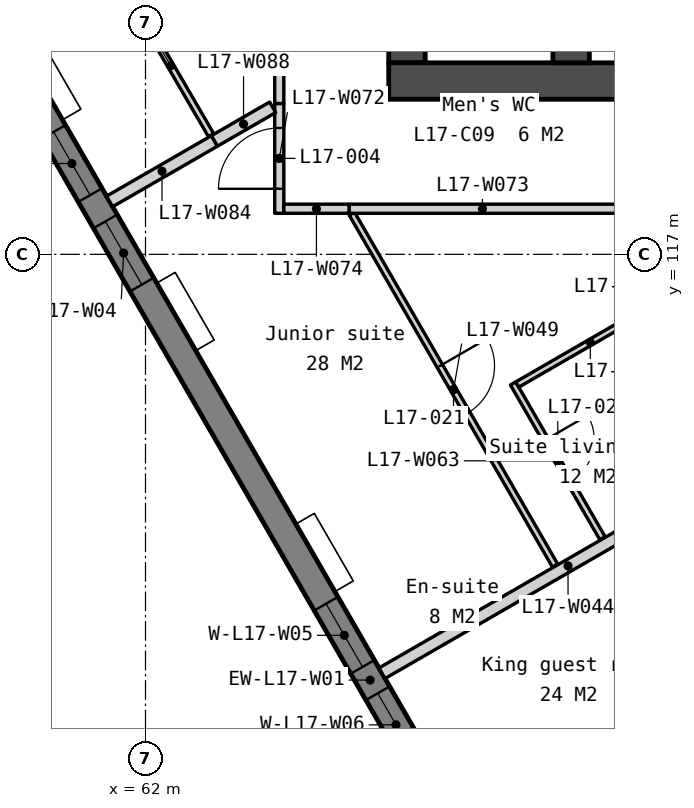
"""IFC4 building model, lengths in metres.
Left out: names, types, materials, properties, quantities, classifications, styles, units other than length and angle.
Written with IfcOpenShell. Run it as: python <this file> out.ifc"""

import sys

from ifc_helpers import new_model, si_unit, direction, frame, frame_2d, origin, place, context, subcontext, project, spatial, polyline, rectangle, outline, extrude, element, fill, save


model = new_model("IFC4")
c1 = context("Model", 3, precision=1e-05, world=origin(), true_north=direction((0.0, 1.0)))
c2 = subcontext(c1, "Body", "Model", "MODEL_VIEW")
j1 = project(units=[si_unit("LENGTHUNIT", "METRE"), si_unit("PLANEANGLEUNIT", "RADIAN")], contexts=[c1])
p1 = place(None, origin())
s1 = spatial("IfcSite", under=j1, at=p1, CompositionType="ELEMENT")
p2 = place(p1, origin())
s2 = spatial("IfcBuilding", under=s1, at=p2, CompositionType="ELEMENT")
p3 = place(p2, frame((0.0, 0.0, 73.5)))
s3 = spatial("IfcBuildingStorey", under=s2, at=p3, CompositionType="ELEMENT", Elevation=73.5)
p4 = place(p3, frame((66.3, 133.95, 0.0), z_axis=(0.0, 0.0, 1.0), x_axis=(0.0, -1.0, 0.0)))
e1 = element("IfcWall", 1, at=p4, inside=s3, PredefinedType="SOLIDWALL", context=c2, shape_type="SweptSolid", body=[
    extrude(rectangle(XDim=13.8, YDim=0.6, at=frame_2d((6.9, 0.0))), origin(), (0.0, 0.0, 1.0), 3.25),
])
p5 = place(p4, frame((0.6, 0.0, 0.0)))
e2 = element("IfcOpeningElement", 2, at=p5, cuts=e1, PredefinedType="OPENING", context=c2, shape_type="SweptSolid", body=[
    extrude(rectangle(XDim=1.1, YDim=2.1, at=frame_2d((0.55, 1.05))), frame((0.0, 0.31, 0.0), z_axis=(0.0, -1.0, 0.0), x_axis=(1.0, 0.0, 0.0)), (0.0, 0.0, 1.0), 0.62),
])
p6 = place(p4, frame((8.963, 0.0, 0.0)))
e3 = element("IfcOpeningElement", 3, at=p6, cuts=e1, PredefinedType="OPENING", context=c2, shape_type="SweptSolid", body=[
    extrude(rectangle(XDim=1.0, YDim=2.1, at=frame_2d((0.5, 1.05))), frame((0.0, 0.31, 0.0), z_axis=(0.0, -1.0, 0.0), x_axis=(1.0, 0.0, 0.0)), (0.0, 0.0, 1.0), 0.62),
])
p7 = place(p4, frame((11.888, 0.0, 0.0)))
e4 = element("IfcOpeningElement", 4, at=p7, cuts=e1, PredefinedType="OPENING", context=c2, shape_type="SweptSolid", body=[
    extrude(rectangle(XDim=1.0, YDim=2.1, at=frame_2d((0.5, 1.05))), frame((0.0, 0.31, 0.0), z_axis=(0.0, -1.0, 0.0), x_axis=(1.0, 0.0, 0.0)), (0.0, 0.0, 1.0), 0.62),
])
p8 = place(p3, frame((66.0, 119.85, 0.0), z_axis=(0.0, 0.0, 1.0), x_axis=(1.0, 0.0, 0.0)))
e5 = element("IfcWall", 5, at=p8, inside=s3, PredefinedType="SOLIDWALL", context=c2, shape_type="SweptSolid", body=[
    extrude(rectangle(XDim=28.0, YDim=0.6, at=frame_2d((14.0, 0.0))), origin(), (0.0, 0.0, 1.0), 3.25),
])
p9 = place(p8, frame((6.825, 0.0, 0.0)))
e6 = element("IfcOpeningElement", 6, at=p9, cuts=e5, PredefinedType="OPENING", context=c2, shape_type="SweptSolid", body=[
    extrude(rectangle(XDim=1.8, YDim=2.1, at=frame_2d((0.9, 1.05))), frame((0.0, 0.31, 0.0), z_axis=(0.0, -1.0, 0.0), x_axis=(1.0, 0.0, 0.0)), (0.0, 0.0, 1.0), 0.62),
])
p10 = place(p8, frame((15.85, 0.0, 0.0)))
e7 = element("IfcOpeningElement", 7, at=p10, cuts=e5, PredefinedType="OPENING", context=c2, shape_type="SweptSolid", body=[
    extrude(rectangle(XDim=1.5, YDim=2.1, at=frame_2d((0.75, 1.05))), frame((0.0, 0.31, 0.0), z_axis=(0.0, -1.0, 0.0), x_axis=(1.0, 0.0, 0.0)), (0.0, 0.0, 1.0), 0.62),
])
p11 = place(p8, frame((19.375, 0.0, 0.0)))
e8 = element("IfcOpeningElement", 8, at=p11, cuts=e5, PredefinedType="OPENING", context=c2, shape_type="SweptSolid", body=[
    extrude(rectangle(XDim=1.8, YDim=2.1, at=frame_2d((0.9, 1.05))), frame((0.0, 0.31, 0.0), z_axis=(0.0, -1.0, 0.0), x_axis=(1.0, 0.0, 0.0)), (0.0, 0.0, 1.0), 0.62),
])
p12 = place(p8, frame((4.425, 0.0, 0.0)))
e9 = element("IfcOpeningElement", 9, at=p12, cuts=e5, PredefinedType="OPENING", context=c2, shape_type="SweptSolid", body=[
    extrude(rectangle(XDim=1.0, YDim=2.1, at=frame_2d((0.5, 1.05))), frame((0.0, 0.31, 0.0), z_axis=(0.0, -1.0, 0.0), x_axis=(1.0, 0.0, 0.0)), (0.0, 0.0, 1.0), 0.62),
])
p13 = place(p8, frame((9.783, 0.0, 0.0)))
e10 = element("IfcOpeningElement", 10, at=p13, cuts=e5, PredefinedType="OPENING", context=c2, shape_type="SweptSolid", body=[
    extrude(rectangle(XDim=1.0, YDim=2.1, at=frame_2d((0.5, 1.05))), frame((0.0, 0.31, 0.0), z_axis=(0.0, -1.0, 0.0), x_axis=(1.0, 0.0, 0.0)), (0.0, 0.0, 1.0), 0.62),
])
p14 = place(p8, frame((11.525, 0.0, 0.0)))
e11 = element("IfcOpeningElement", 11, at=p14, cuts=e5, PredefinedType="OPENING", context=c2, shape_type="SweptSolid", body=[
    extrude(rectangle(XDim=1.0, YDim=2.1, at=frame_2d((0.5, 1.05))), frame((0.0, 0.31, 0.0), z_axis=(0.0, -1.0, 0.0), x_axis=(1.0, 0.0, 0.0)), (0.0, 0.0, 1.0), 0.62),
])
p15 = place(p8, frame((13.658, 0.0, 0.0)))
e12 = element("IfcOpeningElement", 12, at=p15, cuts=e5, PredefinedType="OPENING", context=c2, shape_type="SweptSolid", body=[
    extrude(rectangle(XDim=1.0, YDim=2.1, at=frame_2d((0.5, 1.05))), frame((0.0, 0.31, 0.0), z_axis=(0.0, -1.0, 0.0), x_axis=(1.0, 0.0, 0.0)), (0.0, 0.0, 1.0), 0.62),
])
p16 = place(p8, frame((22.575, 0.0, 0.0)))
e13 = element("IfcOpeningElement", 13, at=p16, cuts=e5, PredefinedType="OPENING", context=c2, shape_type="SweptSolid", body=[
    extrude(rectangle(XDim=1.0, YDim=2.1, at=frame_2d((0.5, 1.05))), frame((0.0, 0.31, 0.0), z_axis=(0.0, -1.0, 0.0), x_axis=(1.0, 0.0, 0.0)), (0.0, 0.0, 1.0), 0.62),
])
p17 = place(p3, frame((69.0, 122.25, 0.0), z_axis=(0.0, 0.0, 1.0), x_axis=(0.0, -1.0, 0.0)))
e14 = element("IfcWall", 14, at=p17, inside=s3, PredefinedType="SOLIDWALL", context=c2, shape_type="SweptSolid", body=[
    extrude(rectangle(XDim=2.1, YDim=0.6, at=frame_2d((1.05, 0.0))), origin(), (0.0, 0.0, 1.0), 3.25),
])
p18 = place(p3, frame((54.495, 129.397, -0.15), z_axis=(0.0, 0.0, 1.0), x_axis=(0.499999201451, -0.866025864826, 0.0)))
e15 = element("IfcWall", 15, at=p18, inside=s3, PredefinedType="SOLIDWALL", context=c2, shape_type="SweptSolid", body=[
    extrude(outline(polyline([(44.8, 0.0), (44.8, 3.4), (0.0, 3.4), (0.0, 0.0), (44.8, 0.0)])), frame((0.0, 0.225, 0.0), z_axis=(0.0, -1.0, 0.0), x_axis=(1.0, 0.0, 0.0)), (0.0, 0.0, 1.0), 0.45),
])
p19 = place(p18, frame((3.03, 0.0, 1.05)))
e16 = element("IfcOpeningElement", 16, at=p19, cuts=e15, PredefinedType="OPENING", context=c2, shape_type="SweptSolid", body=[
    extrude(rectangle(XDim=1.2, YDim=1.5, at=frame_2d((0.6, 0.75))), frame((0.0, 0.235, 0.0), z_axis=(0.0, -1.0, 0.0), x_axis=(1.0, 0.0, 0.0)), (0.0, 0.0, 1.0), 0.47),
])
p20 = place(p18, frame((4.73, 0.0, 1.05)))
e17 = element("IfcOpeningElement", 17, at=p20, cuts=e15, PredefinedType="OPENING", context=c2, shape_type="SweptSolid", body=[
    extrude(rectangle(XDim=1.2, YDim=1.5, at=frame_2d((0.6, 0.75))), frame((0.0, 0.235, 0.0), z_axis=(0.0, -1.0, 0.0), x_axis=(1.0, 0.0, 0.0)), (0.0, 0.0, 1.0), 0.47),
])
p21 = place(p18, frame((11.99, 0.0, 1.05)))
e18 = element("IfcOpeningElement", 18, at=p21, cuts=e15, PredefinedType="OPENING", context=c2, shape_type="SweptSolid", body=[
    extrude(rectangle(XDim=1.2, YDim=1.5, at=frame_2d((0.6, 0.75))), frame((0.0, 0.235, 0.0), z_axis=(0.0, -1.0, 0.0), x_axis=(1.0, 0.0, 0.0)), (0.0, 0.0, 1.0), 0.47),
])
p22 = place(p18, frame((13.69, 0.0, 1.05)))
e19 = element("IfcOpeningElement", 19, at=p22, cuts=e15, PredefinedType="OPENING", context=c2, shape_type="SweptSolid", body=[
    extrude(rectangle(XDim=1.2, YDim=1.5, at=frame_2d((0.6, 0.75))), frame((0.0, 0.235, 0.0), z_axis=(0.0, -1.0, 0.0), x_axis=(1.0, 0.0, 0.0)), (0.0, 0.0, 1.0), 0.47),
])
p23 = place(p18, frame((20.95, 0.0, 1.05)))
e20 = element("IfcOpeningElement", 20, at=p23, cuts=e15, PredefinedType="OPENING", context=c2, shape_type="SweptSolid", body=[
    extrude(rectangle(XDim=1.2, YDim=1.5, at=frame_2d((0.6, 0.75))), frame((0.0, 0.235, 0.0), z_axis=(0.0, -1.0, 0.0), x_axis=(1.0, 0.0, 0.0)), (0.0, 0.0, 1.0), 0.47),
])
p24 = place(p18, frame((22.65, 0.0, 1.05)))
e21 = element("IfcOpeningElement", 21, at=p24, cuts=e15, PredefinedType="OPENING", context=c2, shape_type="SweptSolid", body=[
    extrude(rectangle(XDim=1.2, YDim=1.5, at=frame_2d((0.6, 0.75))), frame((0.0, 0.235, 0.0), z_axis=(0.0, -1.0, 0.0), x_axis=(1.0, 0.0, 0.0)), (0.0, 0.0, 1.0), 0.47),
])
p25 = place(p18, frame((29.91, 0.0, 1.05)))
e22 = element("IfcOpeningElement", 22, at=p25, cuts=e15, PredefinedType="OPENING", context=c2, shape_type="SweptSolid", body=[
    extrude(rectangle(XDim=1.2, YDim=1.5, at=frame_2d((0.6, 0.75))), frame((0.0, 0.235, 0.0), z_axis=(0.0, -1.0, 0.0), x_axis=(1.0, 0.0, 0.0)), (0.0, 0.0, 1.0), 0.47),
])
p26 = place(p18, frame((31.61, 0.0, 1.05)))
e23 = element("IfcOpeningElement", 23, at=p26, cuts=e15, PredefinedType="OPENING", context=c2, shape_type="SweptSolid", body=[
    extrude(rectangle(XDim=1.2, YDim=1.5, at=frame_2d((0.6, 0.75))), frame((0.0, 0.235, 0.0), z_axis=(0.0, -1.0, 0.0), x_axis=(1.0, 0.0, 0.0)), (0.0, 0.0, 1.0), 0.47),
])
p27 = place(p18, frame((38.87, 0.0, 1.05)))
e24 = element("IfcOpeningElement", 24, at=p27, cuts=e15, PredefinedType="OPENING", context=c2, shape_type="SweptSolid", body=[
    extrude(rectangle(XDim=1.2, YDim=1.5, at=frame_2d((0.6, 0.75))), frame((0.0, 0.235, 0.0), z_axis=(0.0, -1.0, 0.0), x_axis=(1.0, 0.0, 0.0)), (0.0, 0.0, 1.0), 0.47),
])
p28 = place(p18, frame((40.57, 0.0, 1.05)))
e25 = element("IfcOpeningElement", 25, at=p28, cuts=e15, PredefinedType="OPENING", context=c2, shape_type="SweptSolid", body=[
    extrude(rectangle(XDim=1.2, YDim=1.5, at=frame_2d((0.6, 0.75))), frame((0.0, 0.235, 0.0), z_axis=(0.0, -1.0, 0.0), x_axis=(1.0, 0.0, 0.0)), (0.0, 0.0, 1.0), 0.47),
])
p29 = place(p3, frame((65.89, 110.11, 0.0), z_axis=(0.0, 0.0, 1.0), x_axis=(0.866033669941, 0.499985682323, 0.0)))
e26 = element("IfcWall", 26, at=p29, inside=s3, PredefinedType="PARTITIONING", context=c2, shape_type="SweptSolid", body=[
    extrude(rectangle(XDim=7.065, YDim=0.2, at=frame_2d((3.533, 0.0))), origin(), (0.0, 0.0, 1.0), 3.25),
])
p30 = place(p3, frame((65.395, 117.668, 0.0), z_axis=(0.0, 0.0, 1.0), x_axis=(0.499986003774, -0.866033484359, 0.0)))
e27 = element("IfcWall", 27, at=p30, inside=s3, PredefinedType="PARTITIONING", context=c2, shape_type="SweptSolid", body=[
    extrude(rectangle(XDim=6.682, YDim=0.1, at=frame_2d((3.341, 0.0))), origin(), (0.0, 0.0, 1.0), 3.25),
])
p31 = place(p30, frame((2.891, 0.0, 0.0)))
e28 = element("IfcOpeningElement", 28, at=p31, cuts=e27, PredefinedType="OPENING", context=c2, shape_type="SweptSolid", body=[
    extrude(rectangle(XDim=0.9, YDim=2.1, at=frame_2d((0.45, 1.05))), frame((0.0, 0.06, 0.0), z_axis=(0.0, -1.0, 0.0), x_axis=(1.0, 0.0, 0.0)), (0.0, 0.0, 1.0), 0.12),
])
p32 = place(p3, frame((68.045, 114.877, 0.0), z_axis=(0.0, 0.0, 1.0), x_axis=(0.499988418424, -0.866032090307, 0.0)))
e29 = element("IfcWall", 29, at=p32, inside=s3, PredefinedType="PARTITIONING", context=c2, shape_type="SweptSolid", body=[
    extrude(rectangle(XDim=2.94, YDim=0.1, at=frame_2d((1.47, 0.0))), origin(), (0.0, 0.0, 1.0), 3.25),
])
p33 = place(p32, frame((1.07, 0.0, 0.0)))
e30 = element("IfcOpeningElement", 30, at=p33, cuts=e29, PredefinedType="OPENING", context=c2, shape_type="SweptSolid", body=[
    extrude(rectangle(XDim=0.8, YDim=2.1, at=frame_2d((0.4, 1.05))), frame((0.0, 0.06, 0.0), z_axis=(0.0, -1.0, 0.0), x_axis=(1.0, 0.0, 0.0)), (0.0, 0.0, 1.0), 0.12),
])
p34 = place(p3, frame((68.114, 114.858, 0.0), z_axis=(0.0, 0.0, 1.0), x_axis=(0.866042014628, 0.499971228071, 0.0)))
e31 = element("IfcWall", 31, at=p34, inside=s3, PredefinedType="PARTITIONING", context=c2, shape_type="SweptSolid", body=[
    extrude(rectangle(XDim=2.775, YDim=0.1, at=frame_2d((1.388, 0.0))), origin(), (0.0, 0.0, 1.0), 3.25),
])
p35 = place(p3, frame((64.2, 117.675, 0.0), z_axis=(0.0, 0.0, 1.0), x_axis=(0.0, 1.0, 0.0)))
e32 = element("IfcWall", 32, at=p35, inside=s3, PredefinedType="PARTITIONING", context=c2, shape_type="SweptSolid", body=[
    extrude(rectangle(XDim=1.806, YDim=0.15, at=frame_2d((0.903, 0.0))), origin(), (0.0, 0.0, 1.0), 3.25),
])
p36 = place(p35, frame((0.403, 0.0, 0.0)))
e33 = element("IfcOpeningElement", 33, at=p36, cuts=e32, PredefinedType="OPENING", context=c2, shape_type="SweptSolid", body=[
    extrude(rectangle(XDim=1.0, YDim=2.1, at=frame_2d((0.5, 1.05))), frame((0.0, 0.085, 0.0), z_axis=(0.0, -1.0, 0.0), x_axis=(1.0, 0.0, 0.0)), (0.0, 0.0, 1.0), 0.17),
])
p37 = place(p3, frame((65.347, 117.75, 0.0), z_axis=(0.0, 0.0, 1.0), x_axis=(1.0, 0.0, 0.0)))
e34 = element("IfcWall", 34, at=p37, inside=s3, PredefinedType="PARTITIONING", context=c2, shape_type="SweptSolid", body=[
    extrude(rectangle(XDim=4.388, YDim=0.15, at=frame_2d((2.194, 0.0))), origin(), (0.0, 0.0, 1.0), 3.25),
])
p38 = place(p3, frame((64.275, 117.75, 0.0), z_axis=(0.0, 0.0, 1.0), x_axis=(1.0, 0.0, 0.0)))
e35 = element("IfcWall", 35, at=p38, inside=s3, PredefinedType="PARTITIONING", context=c2, shape_type="SweptSolid", body=[
    extrude(rectangle(XDim=1.072, YDim=0.15, at=frame_2d((0.536, 0.0))), origin(), (0.0, 0.0, 1.0), 3.25),
])
p39 = place(p3, frame((61.41, 117.87, 0.0), z_axis=(0.0, 0.0, 1.0), x_axis=(0.866038551572, 0.499977226672, 0.0)))
e36 = element("IfcWall", 36, at=p39, inside=s3, PredefinedType="PARTITIONING", context=c2, shape_type="SweptSolid", body=[
    extrude(rectangle(XDim=1.991, YDim=0.2, at=frame_2d((0.995, 0.0))), origin(), (0.0, 0.0, 1.0), 3.25),
])
p40 = place(p3, frame((61.75, 121.242, 0.0), z_axis=(0.0, 0.0, 1.0), x_axis=(0.503163628445, -0.86419116115, 0.0)))
e37 = element("IfcWall", 37, at=p40, inside=s3, PredefinedType="PARTITIONING", context=c2, shape_type="SweptSolid", body=[
    extrude(rectangle(XDim=2.64, YDim=0.1, at=frame_2d((1.32, 0.0))), origin(), (0.0, 0.0, 1.0), 3.25),
])
p41 = place(p3, frame((63.134, 118.865, 0.0), z_axis=(0.0, 0.0, 1.0), x_axis=(0.866075331272, 0.499913513082, 0.0)))
e38 = element("IfcWall", 38, at=p41, inside=s3, PredefinedType="PARTITIONING", context=c2, shape_type="SweptSolid", body=[
    extrude(rectangle(XDim=1.106, YDim=0.2, at=frame_2d((0.553, 0.0))), origin(), (0.0, 0.0, 1.0), 3.25),
])
p42 = place(p3, frame((64.2, 119.481, 0.0), z_axis=(0.0, 0.0, 1.0), x_axis=(0.0, 1.0, 0.0)))
e39 = element("IfcWall", 39, at=p42, inside=s3, PredefinedType="PARTITIONING", context=c2, shape_type="SweptSolid", body=[
    extrude(rectangle(XDim=3.118, YDim=0.15, at=frame_2d((1.559, 0.0))), origin(), (0.0, 0.0, 1.0), 3.25),
])
p43 = place(p21, origin())
e40 = element("IfcWindow", 40, at=p43, inside=s3, PartitioningType="SINGLE_PANEL", PredefinedType="WINDOW", context=c2, shape_type="SweptSolid", body=[
    extrude(rectangle(XDim=1.2, YDim=1.5, at=frame_2d((0.6, 0.75))), frame((0.0, 0.03, 0.0), z_axis=(0.0, -1.0, 0.0), x_axis=(1.0, 0.0, 0.0)), (0.0, 0.0, 1.0), 0.06),
])
fill(e18, e40)
p44 = place(p22, origin())
e41 = element("IfcWindow", 41, at=p44, inside=s3, PartitioningType="SINGLE_PANEL", PredefinedType="WINDOW", context=c2, shape_type="SweptSolid", body=[
    extrude(rectangle(XDim=1.2, YDim=1.5, at=frame_2d((0.6, 0.75))), frame((0.0, 0.03, 0.0), z_axis=(0.0, -1.0, 0.0), x_axis=(1.0, 0.0, 0.0)), (0.0, 0.0, 1.0), 0.06),
])
fill(e19, e41)
p45 = place(p23, origin())
e42 = element("IfcWindow", 42, at=p45, inside=s3, PartitioningType="SINGLE_PANEL", PredefinedType="WINDOW", context=c2, shape_type="SweptSolid", body=[
    extrude(rectangle(XDim=1.2, YDim=1.5, at=frame_2d((0.6, 0.75))), frame((0.0, 0.03, 0.0), z_axis=(0.0, -1.0, 0.0), x_axis=(1.0, 0.0, 0.0)), (0.0, 0.0, 1.0), 0.06),
])
fill(e20, e42)
p46 = place(p24, origin())
e43 = element("IfcWindow", 43, at=p46, inside=s3, PartitioningType="SINGLE_PANEL", PredefinedType="WINDOW", context=c2, shape_type="SweptSolid", body=[
    extrude(rectangle(XDim=1.2, YDim=1.5, at=frame_2d((0.6, 0.75))), frame((0.0, 0.03, 0.0), z_axis=(0.0, -1.0, 0.0), x_axis=(1.0, 0.0, 0.0)), (0.0, 0.0, 1.0), 0.06),
])
fill(e21, e43)
p47 = place(p36, origin())
e44 = element("IfcDoor", 44, at=p47, inside=s3, OperationType="SINGLE_SWING_LEFT", PredefinedType="DOOR", context=c2, shape_type="SweptSolid", body=[
    extrude(rectangle(XDim=1.0, YDim=2.1, at=frame_2d((0.5, 1.05))), frame((0.0, 0.025, 0.0), z_axis=(0.0, -1.0, 0.0), x_axis=(1.0, 0.0, 0.0)), (0.0, 0.0, 1.0), 0.05),
])
fill(e33, e44)
p48 = place(p33, origin())
e45 = element("IfcDoor", 45, at=p48, inside=s3, OperationType="SINGLE_SWING_LEFT", PredefinedType="DOOR", context=c2, shape_type="SweptSolid", body=[
    extrude(rectangle(XDim=0.8, YDim=2.1, at=frame_2d((0.4, 1.05))), frame((0.0, 0.025, 0.0), z_axis=(0.0, -1.0, 0.0), x_axis=(1.0, 0.0, 0.0)), (0.0, 0.0, 1.0), 0.05),
])
fill(e30, e45)
p49 = place(p31, origin())
e46 = element("IfcDoor", 46, at=p49, inside=s3, OperationType="SINGLE_SWING_LEFT", PredefinedType="DOOR", context=c2, shape_type="SweptSolid", body=[
    extrude(rectangle(XDim=0.9, YDim=2.1, at=frame_2d((0.45, 1.05))), frame((0.0, 0.025, 0.0), z_axis=(0.0, -1.0, 0.0), x_axis=(1.0, 0.0, 0.0)), (0.0, 0.0, 1.0), 0.05),
])
fill(e28, e46)
save(model, sys.argv[1])
